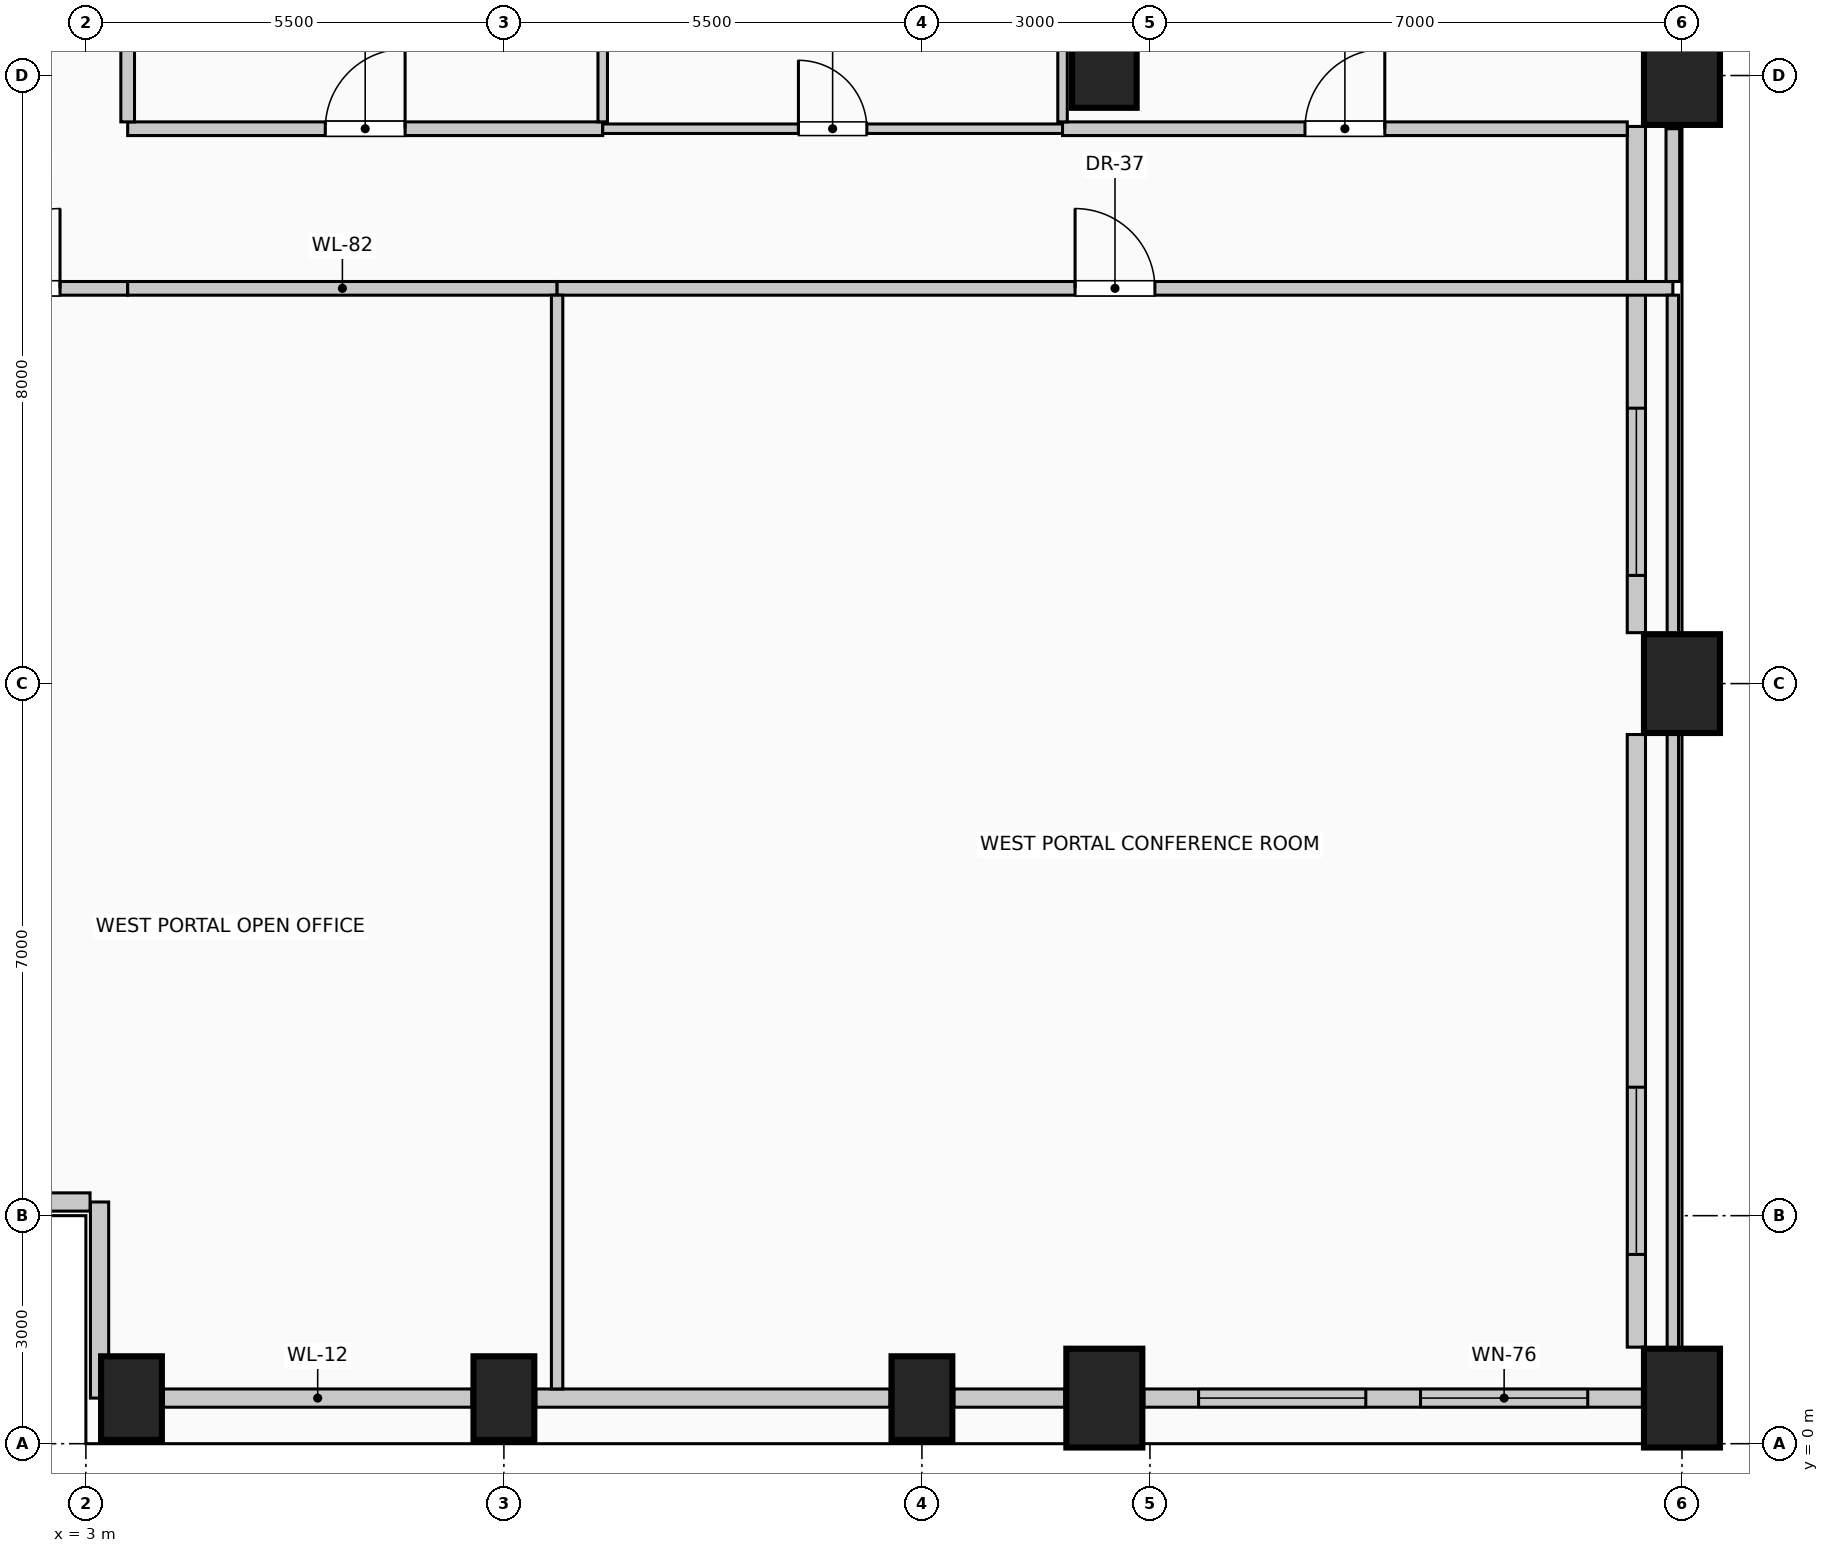
"""IFC4 building model, lengths in metres.
Left out: names, types, materials, properties, quantities, classifications, styles, units other than length and angle.
Written with IfcOpenShell. Run it as: python <this file> out.ifc"""

import sys

from ifc_helpers import new_model, si_unit, direction, frame, frame_2d, origin, origin_2d, place, context, subcontext, project, spatial, rectangle, circle, extrude, element, fill, save


model = new_model("IFC4")
c1 = context("Model", 3, precision=1e-05, world=origin(), true_north=direction((0.0, 1.0)))
c2 = subcontext(c1, "Body", "Model", "MODEL_VIEW")
j1 = project(units=[si_unit("LENGTHUNIT", "METRE"), si_unit("PLANEANGLEUNIT", "RADIAN")], contexts=[c1])
p1 = place(None, origin())
s1 = spatial("IfcSite", under=j1, at=p1, CompositionType="ELEMENT")
p2 = place(p1, origin())
s2 = spatial("IfcBuilding", under=s1, at=p2, CompositionType="ELEMENT")
p3 = place(p2, frame((0.0, 0.0, 186.6)))
s3 = spatial("IfcBuildingStorey", under=s2, at=p3, CompositionType="ELEMENT", Elevation=186.6)
for number, where, z_axis, x_axis in (
    (1, (3.6, 0.6, 0.0), (0.0, 0.0, 1.0), (1.0, 0.0, 0.0)),
    (2, (8.5, 0.6, 0.0), (0.0, 0.0, 1.0), (1.0, 0.0, 0.0)),
    (3, (14.0, 0.6, 0.0), (0.0, 0.0, 1.0), (1.0, 0.0, 0.0)),
):
    element("IfcColumn", number, at=place(p3, frame(where, z_axis=z_axis, x_axis=x_axis)), inside=s3, PredefinedType="COLUMN", context=c2, shape_type="SweptSolid", body=[
        extrude(rectangle(XDim=0.8, YDim=1.1, at=origin_2d()), origin(), (0.0, 0.0, 1.0), 4.0),
    ])
for number, where, z_axis, x_axis in (
    (4, (16.4, 0.6, 0.0), (0.0, 0.0, 1.0), (1.0, 0.0, 0.0)),
    (5, (24.0, 0.6, 0.0), (0.0, 0.0, 1.0), (1.0, 0.0, 0.0)),
    (6, (24.0, 10.0, 0.0), (0.0, 0.0, 1.0), (1.0, 0.0, 0.0)),
    (7, (24.0, 18.0, 0.0), (0.0, 0.0, 1.0), (1.0, 0.0, 0.0)),
):
    element("IfcColumn", number, at=place(p3, frame(where, z_axis=z_axis, x_axis=x_axis)), inside=s3, PredefinedType="COLUMN", context=c2, shape_type="SweptSolid", body=[
        extrude(rectangle(XDim=1.0, YDim=1.3, at=origin_2d()), origin(), (0.0, 0.0, 1.0), 4.0),
    ])
p4 = place(p3, frame((16.4, 18.0, 0.0), z_axis=(0.0, 0.0, 1.0), x_axis=(1.0, 0.0, 0.0)))
e8 = element("IfcColumn", 8, at=p4, inside=s3, PredefinedType="COLUMN", context=c2, shape_type="SweptSolid", body=[
    extrude(circle(Radius=0.425, at=origin_2d()), origin(), (0.0, 0.0, 1.0), 4.0),
])
p5 = place(p3, frame((8.08, 0.6, 0.0), z_axis=(0.0, 0.0, 1.0), x_axis=(-1.0, 0.0, 0.0)))
e9 = element("IfcWall", 9, at=p5, inside=s3, PredefinedType="SOLIDWALL", context=c2, shape_type="SweptSolid", body=[
    extrude(rectangle(XDim=4.06, YDim=0.24, at=frame_2d((2.03, 0.0))), origin(), (0.0, 0.0, 1.0), 3.0),
])
p6 = place(p3, frame((13.58, 0.6, 0.0), z_axis=(0.0, 0.0, 1.0), x_axis=(-1.0, 0.0, 0.0)))
e10 = element("IfcWall", 10, at=p6, inside=s3, PredefinedType="SOLIDWALL", context=c2, shape_type="SweptSolid", body=[
    extrude(rectangle(XDim=4.66, YDim=0.24, at=frame_2d((2.33, 0.0))), origin(), (0.0, 0.0, 1.0), 3.0),
])
p7 = place(p3, frame((15.88, 0.6, 0.0), z_axis=(0.0, 0.0, 1.0), x_axis=(-1.0, 0.0, 0.0)))
e11 = element("IfcWall", 11, at=p7, inside=s3, PredefinedType="SOLIDWALL", context=c2, shape_type="SweptSolid", body=[
    extrude(rectangle(XDim=1.46, YDim=0.24, at=frame_2d((0.73, 0.0))), origin(), (0.0, 0.0, 1.0), 3.0),
])
p8 = place(p3, frame((23.48, 0.6, 0.0), z_axis=(0.0, 0.0, 1.0), x_axis=(-1.0, 0.0, 0.0)))
e12 = element("IfcWall", 12, at=p8, inside=s3, PredefinedType="SOLIDWALL", context=c2, shape_type="SweptSolid", body=[
    extrude(rectangle(XDim=6.56, YDim=0.24, at=frame_2d((3.28, 0.0))), origin(), (0.0, 0.0, 1.0), 3.0),
])
p9 = place(p8, frame((0.72, 0.0, 0.42)))
e13 = element("IfcOpeningElement", 13, at=p9, cuts=e12, PredefinedType="OPENING", context=c2, shape_type="SweptSolid", body=[
    extrude(rectangle(XDim=2.2, YDim=1.95, at=frame_2d((1.1, 0.975))), frame((0.0, 0.13, 0.0), z_axis=(0.0, -1.0, 0.0), x_axis=(1.0, 0.0, 0.0)), (0.0, 0.0, 1.0), 0.26),
])
p10 = place(p8, frame((3.64, 0.0, 0.42)))
e14 = element("IfcOpeningElement", 14, at=p10, cuts=e12, PredefinedType="OPENING", context=c2, shape_type="SweptSolid", body=[
    extrude(rectangle(XDim=2.2, YDim=1.95, at=frame_2d((1.1, 0.975))), frame((0.0, 0.13, 0.0), z_axis=(0.0, -1.0, 0.0), x_axis=(1.0, 0.0, 0.0)), (0.0, 0.0, 1.0), 0.26),
])
p11 = place(p3, frame((3.18, 0.6, 0.0), z_axis=(0.0, 0.0, 1.0), x_axis=(0.0, 1.0, 0.0)))
e15 = element("IfcWall", 15, at=p11, inside=s3, PredefinedType="SOLIDWALL", context=c2, shape_type="SweptSolid", body=[
    extrude(rectangle(XDim=2.58, YDim=0.24, at=frame_2d((1.29, 0.0))), origin(), (0.0, 0.0, 1.0), 3.75),
])
p12 = place(p3, frame((3.055, 3.18, 0.0), z_axis=(0.0, 0.0, 1.0), x_axis=(-1.0, 0.0, 0.0)))
e16 = element("IfcWall", 16, at=p12, inside=s3, PredefinedType="SOLIDWALL", context=c2, shape_type="SweptSolid", body=[
    extrude(rectangle(XDim=2.455, YDim=0.24, at=frame_2d((1.228, 0.0))), origin(), (0.0, 0.0, 1.0), 3.75),
])
p13 = place(p3, frame((23.4, 9.33, 0.0), z_axis=(0.0, 0.0, 1.0), x_axis=(0.0, -1.0, 0.0)))
e17 = element("IfcWall", 17, at=p13, inside=s3, PredefinedType="SOLIDWALL", context=c2, shape_type="SweptSolid", body=[
    extrude(rectangle(XDim=8.06, YDim=0.24, at=frame_2d((4.03, 0.0))), origin(), (0.0, 0.0, 1.0), 3.75),
])
p14 = place(p13, frame((4.64, 0.0, 0.42)))
e18 = element("IfcOpeningElement", 18, at=p14, cuts=e17, PredefinedType="OPENING", context=c2, shape_type="SweptSolid", body=[
    extrude(rectangle(XDim=2.2, YDim=1.95, at=frame_2d((1.1, 0.975))), frame((0.0, 0.13, 0.0), z_axis=(0.0, -1.0, 0.0), x_axis=(1.0, 0.0, 0.0)), (0.0, 0.0, 1.0), 0.26),
])
p15 = place(p3, frame((23.4, 17.33, 0.0), z_axis=(0.0, 0.0, 1.0), x_axis=(0.0, -1.0, 0.0)))
e19 = element("IfcWall", 19, at=p15, inside=s3, PredefinedType="SOLIDWALL", context=c2, shape_type="SweptSolid", body=[
    extrude(rectangle(XDim=6.66, YDim=0.24, at=frame_2d((3.33, 0.0))), origin(), (0.0, 0.0, 1.0), 3.75),
])
p16 = place(p15, frame((3.707, 0.0, 0.42)))
e20 = element("IfcOpeningElement", 20, at=p16, cuts=e19, PredefinedType="OPENING", context=c2, shape_type="SweptSolid", body=[
    extrude(rectangle(XDim=2.2, YDim=1.95, at=frame_2d((1.1, 0.975))), frame((0.0, 0.13, 0.0), z_axis=(0.0, -1.0, 0.0), x_axis=(1.0, 0.0, 0.0)), (0.0, 0.0, 1.0), 0.26),
])
p17 = place(p3, frame((0.72, 15.2, 0.0), z_axis=(0.0, 0.0, 1.0), x_axis=(1.0, 0.0, 0.0)))
e21 = element("IfcWall", 21, at=p17, inside=s3, PredefinedType="PARTITIONING", context=c2, shape_type="SweptSolid", body=[
    extrude(rectangle(XDim=2.83, YDim=0.18, at=frame_2d((1.415, 0.0))), origin(), (0.0, 0.0, 1.0), 3.75),
])
p18 = place(p17, frame((0.89, 0.0, 0.0)))
e22 = element("IfcOpeningElement", 22, at=p18, cuts=e21, PredefinedType="OPENING", context=c2, shape_type="SweptSolid", body=[
    extrude(rectangle(XDim=1.05, YDim=2.15, at=frame_2d((0.525, 1.075))), frame((0.0, 0.1, 0.0), z_axis=(0.0, -1.0, 0.0), x_axis=(1.0, 0.0, 0.0)), (0.0, 0.0, 1.0), 0.2),
])
p19 = place(p3, frame((3.55, 15.2, 0.0), z_axis=(0.0, 0.0, 1.0), x_axis=(1.0, 0.0, 0.0)))
e23 = element("IfcWall", 23, at=p19, inside=s3, PredefinedType="PARTITIONING", context=c2, shape_type="SweptSolid", body=[
    extrude(rectangle(XDim=5.65, YDim=0.18, at=frame_2d((2.825, 0.0))), origin(), (0.0, 0.0, 1.0), 3.75),
])
p20 = place(p3, frame((9.2, 15.2, 0.0), z_axis=(0.0, 0.0, 1.0), x_axis=(1.0, 0.0, 0.0)))
e24 = element("IfcWall", 24, at=p20, inside=s3, PredefinedType="PARTITIONING", context=c2, shape_type="SweptSolid", body=[
    extrude(rectangle(XDim=14.68, YDim=0.18, at=frame_2d((7.34, 0.0))), origin(), (0.0, 0.0, 1.0), 3.75),
])
p21 = place(p20, frame((6.815, 0.0, 0.0)))
e25 = element("IfcOpeningElement", 25, at=p21, cuts=e24, PredefinedType="OPENING", context=c2, shape_type="SweptSolid", body=[
    extrude(rectangle(XDim=1.05, YDim=2.15, at=frame_2d((0.525, 1.075))), frame((0.0, 0.1, 0.0), z_axis=(0.0, -1.0, 0.0), x_axis=(1.0, 0.0, 0.0)), (0.0, 0.0, 1.0), 0.2),
])
p22 = place(p3, frame((3.55, 17.3, 0.0), z_axis=(0.0, 0.0, 1.0), x_axis=(1.0, 0.0, 0.0)))
e26 = element("IfcWall", 26, at=p22, inside=s3, PredefinedType="PARTITIONING", context=c2, shape_type="SweptSolid", body=[
    extrude(rectangle(XDim=6.25, YDim=0.18, at=frame_2d((3.125, 0.0))), origin(), (0.0, 0.0, 1.0), 3.75),
])
p23 = place(p22, frame((2.6, 0.0, 0.0)))
e27 = element("IfcOpeningElement", 27, at=p23, cuts=e26, PredefinedType="OPENING", context=c2, shape_type="SweptSolid", body=[
    extrude(rectangle(XDim=1.05, YDim=2.15, at=frame_2d((0.525, 1.075))), frame((0.0, 0.1, 0.0), z_axis=(0.0, -1.0, 0.0), x_axis=(1.0, 0.0, 0.0)), (0.0, 0.0, 1.0), 0.2),
])
p24 = place(p3, frame((9.8, 17.3, 0.0), z_axis=(0.0, 0.0, 1.0), x_axis=(1.0, 0.0, 0.0)))
e28 = element("IfcWall", 28, at=p24, inside=s3, PredefinedType="PARTITIONING", context=c2, shape_type="SweptSolid", body=[
    extrude(rectangle(XDim=6.05, YDim=0.125, at=frame_2d((3.025, 0.0))), origin(), (0.0, 0.0, 1.0), 3.75),
])
p25 = place(p24, frame((2.575, 0.0, 0.0)))
e29 = element("IfcOpeningElement", 29, at=p25, cuts=e28, PredefinedType="OPENING", context=c2, shape_type="SweptSolid", body=[
    extrude(rectangle(XDim=0.9, YDim=2.1, at=frame_2d((0.45, 1.05))), frame((0.0, 0.073, 0.0), z_axis=(0.0, -1.0, 0.0), x_axis=(1.0, 0.0, 0.0)), (0.0, 0.0, 1.0), 0.145),
])
p26 = place(p3, frame((15.85, 17.3, 0.0), z_axis=(0.0, 0.0, 1.0), x_axis=(1.0, 0.0, 0.0)))
e30 = element("IfcWall", 30, at=p26, inside=s3, PredefinedType="PARTITIONING", context=c2, shape_type="SweptSolid", body=[
    extrude(rectangle(XDim=7.43, YDim=0.18, at=frame_2d((3.715, 0.0))), origin(), (0.0, 0.0, 1.0), 3.75),
])
p27 = place(p26, frame((3.19, 0.0, 0.0)))
e31 = element("IfcOpeningElement", 31, at=p27, cuts=e30, PredefinedType="OPENING", context=c2, shape_type="SweptSolid", body=[
    extrude(rectangle(XDim=1.05, YDim=2.15, at=frame_2d((0.525, 1.075))), frame((0.0, 0.1, 0.0), z_axis=(0.0, -1.0, 0.0), x_axis=(1.0, 0.0, 0.0)), (0.0, 0.0, 1.0), 0.2),
])
p28 = place(p3, frame((3.55, 17.39, 0.0), z_axis=(0.0, 0.0, 1.0), x_axis=(0.0, 1.0, 0.0)))
e32 = element("IfcWall", 32, at=p28, inside=s3, PredefinedType="PARTITIONING", context=c2, shape_type="SweptSolid", body=[
    extrude(rectangle(XDim=7.335, YDim=0.18, at=frame_2d((3.667, 0.0))), origin(), (0.0, 0.0, 1.0), 3.75),
])
p29 = place(p3, frame((9.2, 0.72, 0.0), z_axis=(0.0, 0.0, 1.0), x_axis=(0.0, 1.0, 0.0)))
e33 = element("IfcWall", 33, at=p29, inside=s3, PredefinedType="PARTITIONING", context=c2, shape_type="SweptSolid", body=[
    extrude(rectangle(XDim=14.39, YDim=0.15, at=frame_2d((7.195, 0.0))), origin(), (0.0, 0.0, 1.0), 3.75),
])
for number, where, z_axis, x_axis in (
    (34, (9.8, 17.39, 0.0), (0.0, 0.0, 1.0), (0.0, 1.0, 0.0)),
    (35, (15.85, 17.39, 0.0), (0.0, 0.0, 1.0), (0.0, 1.0, 0.0)),
):
    element("IfcWall", number, at=place(p3, frame(where, z_axis=z_axis, x_axis=x_axis)), inside=s3, PredefinedType="PARTITIONING", context=c2, shape_type="SweptSolid", body=[
        extrude(rectangle(XDim=7.335, YDim=0.125, at=frame_2d((3.667, 0.0))), origin(), (0.0, 0.0, 1.0), 3.75),
    ])
p30 = place(p3, frame((23.88, 1.25, 0.0), z_axis=(0.0, 0.0, 1.0), x_axis=(0.0, 1.0, 0.0)))
e36 = element("IfcWall", 36, at=p30, inside=s3, PredefinedType="PARTITIONING", context=c2, shape_type="SweptSolid", body=[
    extrude(rectangle(XDim=8.1, YDim=0.15, at=frame_2d((4.05, 0.0))), origin(), (0.0, 0.0, 1.0), 3.145),
])
p31 = place(p3, frame((23.88, 10.65, 0.0), z_axis=(0.0, 0.0, 1.0), x_axis=(0.0, 1.0, 0.0)))
e37 = element("IfcWall", 37, at=p31, inside=s3, PredefinedType="PARTITIONING", context=c2, shape_type="SweptSolid", body=[
    extrude(rectangle(XDim=4.46, YDim=0.15, at=frame_2d((2.23, 0.0))), origin(), (0.0, 0.0, 1.0), 3.145),
])
p32 = place(p3, frame((23.88, 15.29, 0.0), z_axis=(0.0, 0.0, 1.0), x_axis=(0.0, 1.0, 0.0)))
e38 = element("IfcWall", 38, at=p32, inside=s3, PredefinedType="PARTITIONING", context=c2, shape_type="SweptSolid", body=[
    extrude(rectangle(XDim=2.01, YDim=0.18, at=frame_2d((1.005, 0.0))), origin(), (0.0, 0.0, 1.0), 3.145),
])
p33 = place(p9, origin())
e39 = element("IfcWindow", 39, at=p33, inside=s3, PartitioningType="SINGLE_PANEL", PredefinedType="WINDOW", context=c2, shape_type="SweptSolid", body=[
    extrude(rectangle(XDim=2.2, YDim=1.95, at=frame_2d((1.1, 0.975))), frame((0.0, 0.03, 0.0), z_axis=(0.0, -1.0, 0.0), x_axis=(1.0, 0.0, 0.0)), (0.0, 0.0, 1.0), 0.06),
])
fill(e13, e39)
p34 = place(p10, origin())
e40 = element("IfcWindow", 40, at=p34, inside=s3, PartitioningType="SINGLE_PANEL", PredefinedType="WINDOW", context=c2, shape_type="SweptSolid", body=[
    extrude(rectangle(XDim=2.2, YDim=1.95, at=frame_2d((1.1, 0.975))), frame((0.0, 0.03, 0.0), z_axis=(0.0, -1.0, 0.0), x_axis=(1.0, 0.0, 0.0)), (0.0, 0.0, 1.0), 0.06),
])
fill(e14, e40)
p35 = place(p14, origin())
e41 = element("IfcWindow", 41, at=p35, inside=s3, PartitioningType="SINGLE_PANEL", PredefinedType="WINDOW", context=c2, shape_type="SweptSolid", body=[
    extrude(rectangle(XDim=2.2, YDim=1.95, at=frame_2d((1.1, 0.975))), frame((0.0, 0.03, 0.0), z_axis=(0.0, -1.0, 0.0), x_axis=(1.0, 0.0, 0.0)), (0.0, 0.0, 1.0), 0.06),
])
fill(e18, e41)
p36 = place(p16, origin())
e42 = element("IfcWindow", 42, at=p36, inside=s3, PartitioningType="SINGLE_PANEL", PredefinedType="WINDOW", context=c2, shape_type="SweptSolid", body=[
    extrude(rectangle(XDim=2.2, YDim=1.95, at=frame_2d((1.1, 0.975))), frame((0.0, 0.03, 0.0), z_axis=(0.0, -1.0, 0.0), x_axis=(1.0, 0.0, 0.0)), (0.0, 0.0, 1.0), 0.06),
])
fill(e20, e42)
p37 = place(p18, origin())
e43 = element("IfcDoor", 43, at=p37, inside=s3, OperationType="SINGLE_SWING_RIGHT", PredefinedType="DOOR", context=c2, shape_type="SweptSolid", body=[
    extrude(rectangle(XDim=1.05, YDim=2.15, at=frame_2d((0.525, 1.075))), frame((0.0, 0.025, 0.0), z_axis=(0.0, -1.0, 0.0), x_axis=(1.0, 0.0, 0.0)), (0.0, 0.0, 1.0), 0.05),
])
fill(e22, e43)
p38 = place(p21, origin())
e44 = element("IfcDoor", 44, at=p38, inside=s3, OperationType="SINGLE_SWING_LEFT", PredefinedType="DOOR", context=c2, shape_type="SweptSolid", body=[
    extrude(rectangle(XDim=1.05, YDim=2.15, at=frame_2d((0.525, 1.075))), frame((0.0, 0.025, 0.0), z_axis=(0.0, -1.0, 0.0), x_axis=(1.0, 0.0, 0.0)), (0.0, 0.0, 1.0), 0.05),
])
fill(e25, e44)
p39 = place(p23, origin())
e45 = element("IfcDoor", 45, at=p39, inside=s3, OperationType="SINGLE_SWING_RIGHT", PredefinedType="DOOR", context=c2, shape_type="SweptSolid", body=[
    extrude(rectangle(XDim=1.05, YDim=2.15, at=frame_2d((0.525, 1.075))), frame((0.0, 0.025, 0.0), z_axis=(0.0, -1.0, 0.0), x_axis=(1.0, 0.0, 0.0)), (0.0, 0.0, 1.0), 0.05),
])
fill(e27, e45)
p40 = place(p25, origin())
e46 = element("IfcDoor", 46, at=p40, inside=s3, OperationType="SINGLE_SWING_LEFT", PredefinedType="DOOR", context=c2, shape_type="SweptSolid", body=[
    extrude(rectangle(XDim=0.9, YDim=2.1, at=frame_2d((0.45, 1.05))), frame((0.0, 0.025, 0.0), z_axis=(0.0, -1.0, 0.0), x_axis=(1.0, 0.0, 0.0)), (0.0, 0.0, 1.0), 0.05),
])
fill(e29, e46)
p41 = place(p27, origin())
e47 = element("IfcDoor", 47, at=p41, inside=s3, OperationType="SINGLE_SWING_RIGHT", PredefinedType="DOOR", context=c2, shape_type="SweptSolid", body=[
    extrude(rectangle(XDim=1.05, YDim=2.15, at=frame_2d((0.525, 1.075))), frame((0.0, 0.025, 0.0), z_axis=(0.0, -1.0, 0.0), x_axis=(1.0, 0.0, 0.0)), (0.0, 0.0, 1.0), 0.05),
])
fill(e31, e47)
save(model, sys.argv[1])
